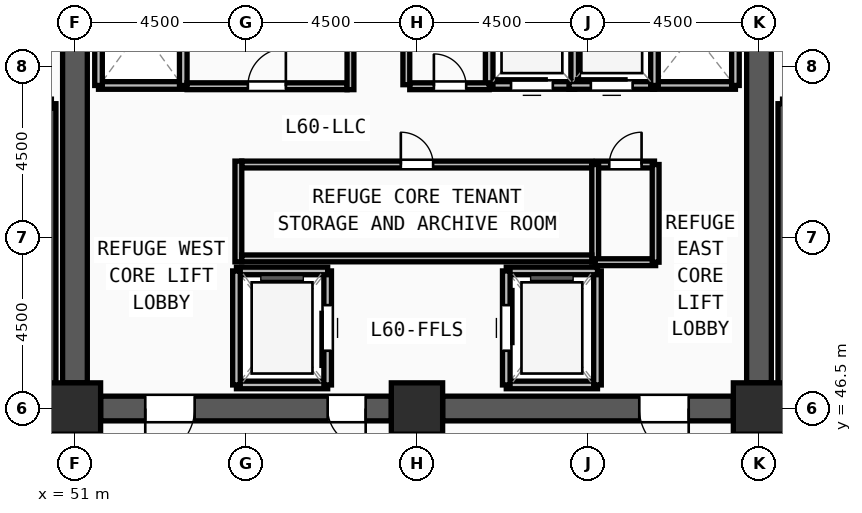
"""IFC4 building model, lengths in metres.
Left out: names, types, materials, properties, quantities, classifications, styles, units other than length and angle.
Written with IfcOpenShell. Run it as: python <this file> out.ifc"""

import sys

from ifc_helpers import new_model, si_unit, direction, frame, frame_2d, origin, origin_2d, place, context, subcontext, project, spatial, rectangle, extrude, source, transform, mapped, element, fill, save


model = new_model("IFC4")
c1 = context("Model", 3, precision=1e-05, world=origin(), true_north=direction((0.0, 1.0)))
c2 = subcontext(c1, "Body", "Model", "MODEL_VIEW")
j1 = project(units=[si_unit("LENGTHUNIT", "METRE"), si_unit("PLANEANGLEUNIT", "RADIAN")], contexts=[c1])
p1 = place(None, origin())
s1 = spatial("IfcSite", under=j1, at=p1, CompositionType="ELEMENT")
p2 = place(p1, origin())
s2 = spatial("IfcBuilding", under=s1, at=p2, CompositionType="ELEMENT")
p3 = place(p2, frame((0.0, 0.0, 231.75)))
s3 = spatial("IfcBuildingStorey", under=s2, at=p3, CompositionType="ELEMENT", Elevation=231.75)
m1 = source(origin(), c2, "Body", "SweptSolid", [
    extrude(rectangle(XDim=1.35, YDim=1.35, at=origin_2d()), origin(), (0.0, 0.0, 1.0), 4.5),
])
for number, where, z_axis, x_axis in (
    (1, (51.0, 46.5, 0.0), (0.0, 0.0, 1.0), (1.0, 0.0, 0.0)),
    (2, (60.0, 46.5, 0.0), (0.0, 0.0, 1.0), (1.0, 0.0, 0.0)),
    (3, (69.0, 46.5, 0.0), (0.0, 0.0, 1.0), (1.0, 0.0, 0.0)),
):
    element("IfcColumn", number, at=place(p3, frame(where, z_axis=z_axis, x_axis=x_axis)), inside=s3, PredefinedType="COLUMN", context=c2, shape_type="MappedRepresentation", body=[
        mapped(m1, transform((0.0, 0.0, 0.0), x_axis=(1.0, 0.0, 0.0), y_axis=(0.0, 1.0, 0.0), z_axis=(0.0, 0.0, 1.0), scale=1.0)),
    ])
p4 = place(p3, frame((69.0, 60.825, 0.0), z_axis=(0.0, 0.0, 1.0), x_axis=(0.0, -1.0, 0.0)))
e4 = element("IfcWall", 4, at=p4, inside=s3, PredefinedType="SHEAR", context=c2, shape_type="SweptSolid", body=[
    extrude(rectangle(XDim=13.65, YDim=0.65, at=frame_2d((6.825, 0.0))), origin(), (0.0, 0.0, 1.0), 4.32),
])
m2 = source(origin(), c2, "Body", "SweptSolid", [
    extrude(rectangle(XDim=1.2, YDim=2.2, at=frame_2d((0.6, 1.1))), frame((0.0, 0.335, 0.0), z_axis=(0.0, -1.0, 0.0), x_axis=(1.0, 0.0, 0.0)), (0.0, 0.0, 1.0), 0.67),
])
p5 = place(p4, frame((1.275, 0.0, 0.0)))
e5 = element("IfcOpeningElement", 5, at=p5, cuts=e4, PredefinedType="OPENING", context=c2, shape_type="MappedRepresentation", body=[
    mapped(m2, transform((0.0, 0.0, 0.0), x_axis=(1.0, 0.0, 0.0), y_axis=(0.0, 1.0, 0.0), z_axis=(0.0, 0.0, 1.0), scale=1.0)),
])
p6 = place(p3, frame((68.325, 46.5, 0.0), z_axis=(0.0, 0.0, 1.0), x_axis=(-1.0, 0.0, 0.0)))
e6 = element("IfcWall", 6, at=p6, inside=s3, PredefinedType="SHEAR", context=c2, shape_type="SweptSolid", body=[
    extrude(rectangle(XDim=7.65, YDim=0.65, at=frame_2d((3.825, 0.0))), origin(), (0.0, 0.0, 1.0), 4.32),
])
m3 = source(origin(), c2, "Body", "SweptSolid", [
    extrude(rectangle(XDim=1.3, YDim=2.2, at=frame_2d((0.65, 1.1))), frame((0.0, 0.335, 0.0), z_axis=(0.0, -1.0, 0.0), x_axis=(1.0, 0.0, 0.0)), (0.0, 0.0, 1.0), 0.67),
])
p7 = place(p6, frame((1.175, 0.0, 0.0)))
e7 = element("IfcOpeningElement", 7, at=p7, cuts=e6, PredefinedType="OPENING", context=c2, shape_type="MappedRepresentation", body=[
    mapped(m3, transform((0.0, 0.0, 0.0), x_axis=(1.0, 0.0, 0.0), y_axis=(0.0, 1.0, 0.0), z_axis=(0.0, 0.0, 1.0), scale=1.0)),
])
p8 = place(p3, frame((59.325, 46.5, 0.0), z_axis=(0.0, 0.0, 1.0), x_axis=(-1.0, 0.0, 0.0)))
e8 = element("IfcWall", 8, at=p8, inside=s3, PredefinedType="SHEAR", context=c2, shape_type="SweptSolid", body=[
    extrude(rectangle(XDim=7.65, YDim=0.65, at=frame_2d((3.825, 0.0))), origin(), (0.0, 0.0, 1.0), 4.32),
])
p9 = place(p8, frame((5.175, 0.0, 0.0)))
e9 = element("IfcOpeningElement", 9, at=p9, cuts=e8, PredefinedType="OPENING", context=c2, shape_type="MappedRepresentation", body=[
    mapped(m3, transform((0.0, 0.0, 0.0), x_axis=(1.0, 0.0, 0.0), y_axis=(0.0, 1.0, 0.0), z_axis=(0.0, 0.0, 1.0), scale=1.0)),
])
m4 = source(origin(), c2, "Body", "SweptSolid", [
    extrude(rectangle(XDim=1.0, YDim=2.2, at=frame_2d((0.5, 1.1))), frame((0.0, 0.335, 0.0), z_axis=(0.0, -1.0, 0.0), x_axis=(1.0, 0.0, 0.0)), (0.0, 0.0, 1.0), 0.67),
])
p10 = place(p8, frame((0.675, 0.0, 0.0)))
e10 = element("IfcOpeningElement", 10, at=p10, cuts=e8, PredefinedType="OPENING", context=c2, shape_type="MappedRepresentation", body=[
    mapped(m4, transform((0.0, 0.0, 0.0), x_axis=(1.0, 0.0, 0.0), y_axis=(0.0, 1.0, 0.0), z_axis=(0.0, 0.0, 1.0), scale=1.0)),
])
p11 = place(p3, frame((51.0, 47.175, 0.0), z_axis=(0.0, 0.0, 1.0), x_axis=(0.0, 1.0, 0.0)))
e11 = element("IfcWall", 11, at=p11, inside=s3, PredefinedType="SHEAR", context=c2, shape_type="SweptSolid", body=[
    extrude(rectangle(XDim=13.65, YDim=0.65, at=frame_2d((6.825, 0.0))), origin(), (0.0, 0.0, 1.0), 4.32),
])
for number, where, z_axis, x_axis in (
    (12, (50.38, 46.7, 0.0), (0.0, 0.0, 1.0), (0.0, 1.0, 0.0)),
    (13, (69.62, 54.52, 0.0), (0.0, 0.0, 1.0), (0.0, -1.0, 0.0)),
):
    element("IfcWall", number, at=place(p3, frame(where, z_axis=z_axis, x_axis=x_axis)), inside=s3, PredefinedType="SOLIDWALL", context=c2, shape_type="SweptSolid", body=[
        extrude(rectangle(XDim=7.82, YDim=0.24, at=frame_2d((3.91, 0.0))), origin(), (0.0, 0.0, 1.0), 4.32),
    ])
p12 = place(p3, frame((55.25, 47.12, 0.0), z_axis=(0.0, 0.0, 1.0), x_axis=(1.0, 0.0, 0.0)))
e14 = element("IfcWall", 14, at=p12, inside=s3, PredefinedType="SOLIDWALL", context=c2, shape_type="SweptSolid", body=[
    extrude(rectangle(XDim=2.4, YDim=0.2, at=frame_2d((1.2, 0.0))), origin(), (0.0, 0.0, 1.0), 4.32),
])
p13 = place(p3, frame((57.65, 47.12, 0.0), z_axis=(0.0, 0.0, 1.0), x_axis=(0.0, 1.0, 0.0)))
e15 = element("IfcWall", 15, at=p13, inside=s3, PredefinedType="SOLIDWALL", context=c2, shape_type="SweptSolid", body=[
    extrude(rectangle(XDim=3.0, YDim=0.2, at=frame_2d((1.5, 0.0))), origin(), (0.0, 0.0, 1.0), 4.32),
])
m5 = source(origin(), c2, "Body", "SweptSolid", [
    extrude(rectangle(XDim=1.2, YDim=2.3, at=frame_2d((0.6, 1.15))), frame((0.0, 0.11, 0.0), z_axis=(0.0, -1.0, 0.0), x_axis=(1.0, 0.0, 0.0)), (0.0, 0.0, 1.0), 0.22),
])
p14 = place(p13, frame((0.9, 0.0, 0.0)))
e16 = element("IfcOpeningElement", 16, at=p14, cuts=e15, PredefinedType="OPENING", context=c2, shape_type="MappedRepresentation", body=[
    mapped(m5, transform((0.0, 0.0, 0.0), x_axis=(1.0, 0.0, 0.0), y_axis=(0.0, 1.0, 0.0), z_axis=(0.0, 0.0, 1.0), scale=1.0)),
])
p15 = place(p3, frame((57.65, 50.12, 0.0), z_axis=(0.0, 0.0, 1.0), x_axis=(-1.0, 0.0, 0.0)))
e17 = element("IfcWall", 17, at=p15, inside=s3, PredefinedType="SOLIDWALL", context=c2, shape_type="SweptSolid", body=[
    extrude(rectangle(XDim=2.4, YDim=0.2, at=frame_2d((1.2, 0.0))), origin(), (0.0, 0.0, 1.0), 4.32),
])
p16 = place(p3, frame((55.25, 50.12, 0.0), z_axis=(0.0, 0.0, 1.0), x_axis=(0.0, -1.0, 0.0)))
e18 = element("IfcWall", 18, at=p16, inside=s3, PredefinedType="SOLIDWALL", context=c2, shape_type="SweptSolid", body=[
    extrude(rectangle(XDim=3.0, YDim=0.2, at=frame_2d((1.5, 0.0))), origin(), (0.0, 0.0, 1.0), 4.32),
])
p17 = place(p3, frame((62.35, 47.12, 0.0), z_axis=(0.0, 0.0, 1.0), x_axis=(1.0, 0.0, 0.0)))
e19 = element("IfcWall", 19, at=p17, inside=s3, PredefinedType="SOLIDWALL", context=c2, shape_type="SweptSolid", body=[
    extrude(rectangle(XDim=2.4, YDim=0.2, at=frame_2d((1.2, 0.0))), origin(), (0.0, 0.0, 1.0), 4.32),
])
p18 = place(p3, frame((64.75, 47.12, 0.0), z_axis=(0.0, 0.0, 1.0), x_axis=(0.0, 1.0, 0.0)))
e20 = element("IfcWall", 20, at=p18, inside=s3, PredefinedType="SOLIDWALL", context=c2, shape_type="SweptSolid", body=[
    extrude(rectangle(XDim=3.0, YDim=0.2, at=frame_2d((1.5, 0.0))), origin(), (0.0, 0.0, 1.0), 4.32),
])
p19 = place(p3, frame((64.75, 50.12, 0.0), z_axis=(0.0, 0.0, 1.0), x_axis=(-1.0, 0.0, 0.0)))
e21 = element("IfcWall", 21, at=p19, inside=s3, PredefinedType="SOLIDWALL", context=c2, shape_type="SweptSolid", body=[
    extrude(rectangle(XDim=2.4, YDim=0.2, at=frame_2d((1.2, 0.0))), origin(), (0.0, 0.0, 1.0), 4.32),
])
p20 = place(p3, frame((62.35, 50.12, 0.0), z_axis=(0.0, 0.0, 1.0), x_axis=(0.0, -1.0, 0.0)))
e22 = element("IfcWall", 22, at=p20, inside=s3, PredefinedType="SOLIDWALL", context=c2, shape_type="SweptSolid", body=[
    extrude(rectangle(XDim=3.0, YDim=0.2, at=frame_2d((1.5, 0.0))), origin(), (0.0, 0.0, 1.0), 4.32),
])
p21 = place(p20, frame((0.9, 0.0, 0.0)))
e23 = element("IfcOpeningElement", 23, at=p21, cuts=e22, PredefinedType="OPENING", context=c2, shape_type="MappedRepresentation", body=[
    mapped(m5, transform((0.0, 0.0, 0.0), x_axis=(1.0, 0.0, 0.0), y_axis=(0.0, 1.0, 0.0), z_axis=(0.0, 0.0, 1.0), scale=1.0)),
])
p22 = place(p3, frame((51.62, 55.0, 0.0), z_axis=(0.0, 0.0, 1.0), x_axis=(1.0, 0.0, 0.0)))
e24 = element("IfcWall", 24, at=p22, inside=s3, PredefinedType="SOLIDWALL", context=c2, shape_type="SweptSolid", body=[
    extrude(rectangle(XDim=2.23, YDim=0.2, at=frame_2d((1.115, 0.0))), origin(), (0.0, 0.0, 1.0), 4.32),
])
for number, where, z_axis, x_axis in (
    (25, (53.85, 55.0, 0.0), (0.0, 0.0, 1.0), (0.0, 1.0, 0.0)),
    (26, (51.62, 58.0, 0.0), (0.0, 0.0, 1.0), (0.0, -1.0, 0.0)),
):
    element("IfcWall", number, at=place(p3, frame(where, z_axis=z_axis, x_axis=x_axis)), inside=s3, PredefinedType="SOLIDWALL", context=c2, shape_type="SweptSolid", body=[
        extrude(rectangle(XDim=3.0, YDim=0.2, at=frame_2d((1.5, 0.0))), origin(), (0.0, 0.0, 1.0), 4.32),
    ])
p23 = place(p3, frame((66.2, 55.0, 0.0), z_axis=(0.0, 0.0, 1.0), x_axis=(1.0, 0.0, 0.0)))
e27 = element("IfcWall", 27, at=p23, inside=s3, PredefinedType="SOLIDWALL", context=c2, shape_type="SweptSolid", body=[
    extrude(rectangle(XDim=2.18, YDim=0.2, at=frame_2d((1.09, 0.0))), origin(), (0.0, 0.0, 1.0), 4.32),
])
p24 = place(p3, frame((68.38, 55.0, 0.0), z_axis=(0.0, 0.0, 1.0), x_axis=(0.0, 1.0, 0.0)))
e28 = element("IfcWall", 28, at=p24, inside=s3, PredefinedType="SOLIDWALL", context=c2, shape_type="SweptSolid", body=[
    extrude(rectangle(XDim=2.75, YDim=0.2, at=frame_2d((1.375, 0.0))), origin(), (0.0, 0.0, 1.0), 4.32),
])
p25 = place(p3, frame((61.9, 55.0, 0.0), z_axis=(0.0, 0.0, 1.0), x_axis=(1.0, 0.0, 0.0)))
e29 = element("IfcWall", 29, at=p25, inside=s3, PredefinedType="SOLIDWALL", context=c2, shape_type="SweptSolid", body=[
    extrude(rectangle(XDim=2.25, YDim=0.2, at=frame_2d((1.125, 0.0))), origin(), (0.0, 0.0, 1.0), 4.32),
])
m6 = source(origin(), c2, "Body", "SweptSolid", [
    extrude(rectangle(XDim=1.1, YDim=2.2, at=frame_2d((0.55, 1.1))), frame((0.0, 0.11, 0.0), z_axis=(0.0, -1.0, 0.0), x_axis=(1.0, 0.0, 0.0)), (0.0, 0.0, 1.0), 0.22),
])
p26 = place(p25, frame((0.575, 0.0, 0.0)))
e30 = element("IfcOpeningElement", 30, at=p26, cuts=e29, PredefinedType="OPENING", context=c2, shape_type="MappedRepresentation", body=[
    mapped(m6, transform((0.0, 0.0, 0.0), x_axis=(1.0, 0.0, 0.0), y_axis=(0.0, 1.0, 0.0), z_axis=(0.0, 0.0, 1.0), scale=1.0)),
])
for number, where, z_axis, x_axis in (
    (31, (64.15, 55.0, 0.0), (0.0, 0.0, 1.0), (0.0, 1.0, 0.0)),
    (32, (61.9, 57.6, 0.0), (0.0, 0.0, 1.0), (0.0, -1.0, 0.0)),
):
    element("IfcWall", number, at=place(p3, frame(where, z_axis=z_axis, x_axis=x_axis)), inside=s3, PredefinedType="SOLIDWALL", context=c2, shape_type="SweptSolid", body=[
        extrude(rectangle(XDim=2.6, YDim=0.2, at=frame_2d((1.3, 0.0))), origin(), (0.0, 0.0, 1.0), 4.32),
    ])
p27 = place(p3, frame((64.0, 55.0, 0.0), z_axis=(0.0, 0.0, 1.0), x_axis=(1.0, 0.0, 0.0)))
e33 = element("IfcWall", 33, at=p27, inside=s3, PredefinedType="SOLIDWALL", context=c2, shape_type="SweptSolid", body=[
    extrude(rectangle(XDim=2.25, YDim=0.2, at=frame_2d((1.125, 0.0))), origin(), (0.0, 0.0, 1.0), 4.32),
])
p28 = place(p27, frame((0.575, 0.0, 0.0)))
e34 = element("IfcOpeningElement", 34, at=p28, cuts=e33, PredefinedType="OPENING", context=c2, shape_type="MappedRepresentation", body=[
    mapped(m6, transform((0.0, 0.0, 0.0), x_axis=(1.0, 0.0, 0.0), y_axis=(0.0, 1.0, 0.0), z_axis=(0.0, 0.0, 1.0), scale=1.0)),
])
p29 = place(p3, frame((66.25, 55.0, 0.0), z_axis=(0.0, 0.0, 1.0), x_axis=(0.0, 1.0, 0.0)))
e35 = element("IfcWall", 35, at=p29, inside=s3, PredefinedType="SOLIDWALL", context=c2, shape_type="SweptSolid", body=[
    extrude(rectangle(XDim=2.6, YDim=0.2, at=frame_2d((1.3, 0.0))), origin(), (0.0, 0.0, 1.0), 4.32),
])
p30 = place(p3, frame((55.39, 52.92, 0.0), z_axis=(0.0, 0.0, 1.0), x_axis=(1.0, 0.0, 0.0)))
e36 = element("IfcWall", 36, at=p30, inside=s3, PredefinedType="PARTITIONING", context=c2, shape_type="SweptSolid", body=[
    extrude(rectangle(XDim=9.21, YDim=0.18, at=frame_2d((4.605, 0.0))), origin(), (0.0, 0.0, 1.0), 4.32),
])
m7 = source(origin(), c2, "Body", "SweptSolid", [
    extrude(rectangle(XDim=0.85, YDim=2.1, at=frame_2d((0.425, 1.05))), frame((0.0, 0.1, 0.0), z_axis=(0.0, -1.0, 0.0), x_axis=(1.0, 0.0, 0.0)), (0.0, 0.0, 1.0), 0.2),
])
p31 = place(p30, frame((4.185, 0.0, 0.0)))
e37 = element("IfcOpeningElement", 37, at=p31, cuts=e36, PredefinedType="OPENING", context=c2, shape_type="MappedRepresentation", body=[
    mapped(m7, transform((0.0, 0.0, 0.0), x_axis=(1.0, 0.0, 0.0), y_axis=(0.0, 1.0, 0.0), z_axis=(0.0, 0.0, 1.0), scale=1.0)),
])
p32 = place(p3, frame((53.95, 54.98, 0.0), z_axis=(0.0, 0.0, 1.0), x_axis=(1.0, 0.0, 0.0)))
e38 = element("IfcWall", 38, at=p32, inside=s3, PredefinedType="PARTITIONING", context=c2, shape_type="SweptSolid", body=[
    extrude(rectangle(XDim=4.21, YDim=0.18, at=frame_2d((2.105, 0.0))), origin(), (0.0, 0.0, 1.0), 4.32),
])
m8 = source(origin(), c2, "Body", "SweptSolid", [
    extrude(rectangle(XDim=1.0, YDim=2.2, at=frame_2d((0.5, 1.1))), frame((0.0, 0.1, 0.0), z_axis=(0.0, -1.0, 0.0), x_axis=(1.0, 0.0, 0.0)), (0.0, 0.0, 1.0), 0.2),
])
p33 = place(p32, frame((1.6, 0.0, 0.0)))
e39 = element("IfcOpeningElement", 39, at=p33, cuts=e38, PredefinedType="OPENING", context=c2, shape_type="MappedRepresentation", body=[
    mapped(m8, transform((0.0, 0.0, 0.0), x_axis=(1.0, 0.0, 0.0), y_axis=(0.0, 1.0, 0.0), z_axis=(0.0, 0.0, 1.0), scale=1.0)),
])
p34 = place(p3, frame((59.81, 54.98, 0.0), z_axis=(0.0, 0.0, 1.0), x_axis=(1.0, 0.0, 0.0)))
e40 = element("IfcWall", 40, at=p34, inside=s3, PredefinedType="PARTITIONING", context=c2, shape_type="SweptSolid", body=[
    extrude(rectangle(XDim=2.09, YDim=0.18, at=frame_2d((1.045, 0.0))), origin(), (0.0, 0.0, 1.0), 4.32),
])
p35 = place(p34, frame((0.635, 0.0, 0.0)))
e41 = element("IfcOpeningElement", 41, at=p35, cuts=e40, PredefinedType="OPENING", context=c2, shape_type="MappedRepresentation", body=[
    mapped(m7, transform((0.0, 0.0, 0.0), x_axis=(1.0, 0.0, 0.0), y_axis=(0.0, 1.0, 0.0), z_axis=(0.0, 0.0, 1.0), scale=1.0)),
])
p36 = place(p3, frame((64.72, 52.92, 0.0), z_axis=(0.0, 0.0, 1.0), x_axis=(1.0, 0.0, 0.0)))
e42 = element("IfcWall", 42, at=p36, inside=s3, PredefinedType="PARTITIONING", context=c2, shape_type="SweptSolid", body=[
    extrude(rectangle(XDim=1.53, YDim=0.18, at=frame_2d((0.765, 0.0))), origin(), (0.0, 0.0, 1.0), 4.32),
])
p37 = place(p36, frame((0.34, 0.0, 0.0)))
e43 = element("IfcOpeningElement", 43, at=p37, cuts=e42, PredefinedType="OPENING", context=c2, shape_type="MappedRepresentation", body=[
    mapped(m7, transform((0.0, 0.0, 0.0), x_axis=(1.0, 0.0, 0.0), y_axis=(0.0, 1.0, 0.0), z_axis=(0.0, 0.0, 1.0), scale=1.0)),
])
p38 = place(p3, frame((59.72, 55.02, 0.0), z_axis=(0.0, 0.0, 1.0), x_axis=(0.0, 1.0, 0.0)))
e44 = element("IfcWall", 44, at=p38, inside=s3, PredefinedType="PARTITIONING", context=c2, shape_type="SweptSolid", body=[
    extrude(rectangle(XDim=1.73, YDim=0.18, at=frame_2d((0.865, 0.0))), origin(), (0.0, 0.0, 1.0), 4.32),
])
p39 = place(p3, frame((64.69, 50.35, 0.0), z_axis=(0.0, 0.0, 1.0), x_axis=(0.0, 1.0, 0.0)))
e45 = element("IfcWall", 45, at=p39, inside=s3, PredefinedType="PARTITIONING", context=c2, shape_type="SweptSolid", body=[
    extrude(rectangle(XDim=2.57, YDim=0.18, at=frame_2d((1.285, 0.0))), origin(), (0.0, 0.0, 1.0), 4.32),
])
p40 = place(p3, frame((64.69, 50.35, 0.0), z_axis=(0.0, 0.0, 1.0), x_axis=(1.0, 0.0, 0.0)))
e46 = element("IfcWall", 46, at=p40, inside=s3, PredefinedType="PARTITIONING", context=c2, shape_type="SweptSolid", body=[
    extrude(rectangle(XDim=1.59, YDim=0.18, at=frame_2d((0.795, 0.0))), origin(), (0.0, 0.0, 1.0), 4.32),
])
p41 = place(p3, frame((66.28, 50.35, 0.0), z_axis=(0.0, 0.0, 1.0), x_axis=(0.0, 1.0, 0.0)))
e47 = element("IfcWall", 47, at=p41, inside=s3, PredefinedType="PARTITIONING", context=c2, shape_type="SweptSolid", body=[
    extrude(rectangle(XDim=2.57, YDim=0.18, at=frame_2d((1.285, 0.0))), origin(), (0.0, 0.0, 1.0), 4.32),
])
p42 = place(p3, frame((55.3, 50.36, 0.0), z_axis=(0.0, 0.0, 1.0), x_axis=(0.0, 1.0, 0.0)))
e48 = element("IfcWall", 48, at=p42, inside=s3, PredefinedType="PARTITIONING", context=c2, shape_type="SweptSolid", body=[
    extrude(rectangle(XDim=2.65, YDim=0.18, at=frame_2d((1.325, 0.0))), origin(), (0.0, 0.0, 1.0), 4.32),
])
p43 = place(p3, frame((55.39, 50.45, 0.0), z_axis=(0.0, 0.0, 1.0), x_axis=(1.0, 0.0, 0.0)))
e49 = element("IfcWall", 49, at=p43, inside=s3, PredefinedType="PARTITIONING", context=c2, shape_type="SweptSolid", body=[
    extrude(rectangle(XDim=9.21, YDim=0.18, at=frame_2d((4.605, 0.0))), origin(), (0.0, 0.0, 1.0), 4.32),
])
p44 = place(p3, frame((58.25, 54.89, 0.0), z_axis=(0.0, 0.0, 1.0), x_axis=(0.0, 1.0, 0.0)))
e50 = element("IfcWall", 50, at=p44, inside=s3, PredefinedType="PARTITIONING", context=c2, shape_type="SweptSolid", body=[
    extrude(rectangle(XDim=2.78, YDim=0.18, at=frame_2d((1.39, 0.0))), origin(), (0.0, 0.0, 1.0), 4.32),
])
m9 = source(origin(), c2, "Body", "SweptSolid", [
    extrude(rectangle(XDim=1.3, YDim=2.2, at=frame_2d((0.65, 1.1))), frame((0.0, 0.025, 0.0), z_axis=(0.0, -1.0, 0.0), x_axis=(1.0, 0.0, 0.0)), (0.0, 0.0, 1.0), 0.05),
])
p45 = place(p9, origin())
e51 = element("IfcDoor", 51, at=p45, inside=s3, OperationType="SINGLE_SWING_RIGHT", PredefinedType="DOOR", context=c2, shape_type="MappedRepresentation", body=[
    mapped(m9, transform((0.0, 0.0, 0.0), x_axis=(1.0, 0.0, 0.0), y_axis=(0.0, 1.0, 0.0), z_axis=(0.0, 0.0, 1.0), scale=1.0)),
])
fill(e9, e51)
m10 = source(origin(), c2, "Body", "SweptSolid", [
    extrude(rectangle(XDim=1.0, YDim=2.2, at=frame_2d((0.5, 1.1))), frame((0.0, 0.025, 0.0), z_axis=(0.0, -1.0, 0.0), x_axis=(1.0, 0.0, 0.0)), (0.0, 0.0, 1.0), 0.05),
])
p46 = place(p10, origin())
e52 = element("IfcDoor", 52, at=p46, inside=s3, OperationType="SINGLE_SWING_LEFT", PredefinedType="DOOR", context=c2, shape_type="MappedRepresentation", body=[
    mapped(m10, transform((0.0, 0.0, 0.0), x_axis=(1.0, 0.0, 0.0), y_axis=(0.0, 1.0, 0.0), z_axis=(0.0, 0.0, 1.0), scale=1.0)),
])
fill(e10, e52)
p47 = place(p7, origin())
e53 = element("IfcDoor", 53, at=p47, inside=s3, OperationType="SINGLE_SWING_LEFT", PredefinedType="DOOR", context=c2, shape_type="MappedRepresentation", body=[
    mapped(m9, transform((0.0, 0.0, 0.0), x_axis=(1.0, 0.0, 0.0), y_axis=(0.0, 1.0, 0.0), z_axis=(0.0, 0.0, 1.0), scale=1.0)),
])
fill(e7, e53)
m11 = source(origin(), c2, "Body", "SweptSolid", [
    extrude(rectangle(XDim=1.2, YDim=2.3, at=frame_2d((0.6, 1.15))), frame((0.0, 0.025, 0.0), z_axis=(0.0, -1.0, 0.0), x_axis=(1.0, 0.0, 0.0)), (0.0, 0.0, 1.0), 0.05),
])
p48 = place(p14, origin())
e54 = element("IfcDoor", 54, at=p48, inside=s3, OperationType="SLIDING_TO_LEFT", PredefinedType="DOOR", context=c2, shape_type="MappedRepresentation", body=[
    mapped(m11, transform((0.0, 0.0, 0.0), x_axis=(1.0, 0.0, 0.0), y_axis=(0.0, 1.0, 0.0), z_axis=(0.0, 0.0, 1.0), scale=1.0)),
])
fill(e16, e54)
p49 = place(p21, origin())
e55 = element("IfcDoor", 55, at=p49, inside=s3, OperationType="SLIDING_TO_LEFT", PredefinedType="DOOR", context=c2, shape_type="MappedRepresentation", body=[
    mapped(m11, transform((0.0, 0.0, 0.0), x_axis=(1.0, 0.0, 0.0), y_axis=(0.0, 1.0, 0.0), z_axis=(0.0, 0.0, 1.0), scale=1.0)),
])
fill(e23, e55)
m12 = source(origin(), c2, "Body", "SweptSolid", [
    extrude(rectangle(XDim=1.1, YDim=2.2, at=frame_2d((0.55, 1.1))), frame((0.0, 0.025, 0.0), z_axis=(0.0, -1.0, 0.0), x_axis=(1.0, 0.0, 0.0)), (0.0, 0.0, 1.0), 0.05),
])
p50 = place(p26, origin())
e56 = element("IfcDoor", 56, at=p50, inside=s3, OperationType="SLIDING_TO_LEFT", PredefinedType="DOOR", context=c2, shape_type="MappedRepresentation", body=[
    mapped(m12, transform((0.0, 0.0, 0.0), x_axis=(1.0, 0.0, 0.0), y_axis=(0.0, 1.0, 0.0), z_axis=(0.0, 0.0, 1.0), scale=1.0)),
])
fill(e30, e56)
p51 = place(p28, origin())
e57 = element("IfcDoor", 57, at=p51, inside=s3, OperationType="SLIDING_TO_LEFT", PredefinedType="DOOR", context=c2, shape_type="MappedRepresentation", body=[
    mapped(m12, transform((0.0, 0.0, 0.0), x_axis=(1.0, 0.0, 0.0), y_axis=(0.0, 1.0, 0.0), z_axis=(0.0, 0.0, 1.0), scale=1.0)),
])
fill(e34, e57)
m13 = source(origin(), c2, "Body", "SweptSolid", [
    extrude(rectangle(XDim=0.85, YDim=2.1, at=frame_2d((0.425, 1.05))), frame((0.0, 0.025, 0.0), z_axis=(0.0, -1.0, 0.0), x_axis=(1.0, 0.0, 0.0)), (0.0, 0.0, 1.0), 0.05),
])
p52 = place(p31, origin())
e58 = element("IfcDoor", 58, at=p52, inside=s3, OperationType="SINGLE_SWING_LEFT", PredefinedType="DOOR", context=c2, shape_type="MappedRepresentation", body=[
    mapped(m13, transform((0.0, 0.0, 0.0), x_axis=(1.0, 0.0, 0.0), y_axis=(0.0, 1.0, 0.0), z_axis=(0.0, 0.0, 1.0), scale=1.0)),
])
fill(e37, e58)
p53 = place(p33, origin())
e59 = element("IfcDoor", 59, at=p53, inside=s3, OperationType="SINGLE_SWING_RIGHT", PredefinedType="DOOR", context=c2, shape_type="MappedRepresentation", body=[
    mapped(m10, transform((0.0, 0.0, 0.0), x_axis=(1.0, 0.0, 0.0), y_axis=(0.0, 1.0, 0.0), z_axis=(0.0, 0.0, 1.0), scale=1.0)),
])
fill(e39, e59)
p54 = place(p35, origin())
e60 = element("IfcDoor", 60, at=p54, inside=s3, OperationType="SINGLE_SWING_LEFT", PredefinedType="DOOR", context=c2, shape_type="MappedRepresentation", body=[
    mapped(m13, transform((0.0, 0.0, 0.0), x_axis=(1.0, 0.0, 0.0), y_axis=(0.0, 1.0, 0.0), z_axis=(0.0, 0.0, 1.0), scale=1.0)),
])
fill(e41, e60)
p55 = place(p37, origin())
e61 = element("IfcDoor", 61, at=p55, inside=s3, OperationType="SINGLE_SWING_RIGHT", PredefinedType="DOOR", context=c2, shape_type="MappedRepresentation", body=[
    mapped(m13, transform((0.0, 0.0, 0.0), x_axis=(1.0, 0.0, 0.0), y_axis=(0.0, 1.0, 0.0), z_axis=(0.0, 0.0, 1.0), scale=1.0)),
])
fill(e43, e61)
save(model, sys.argv[1])
